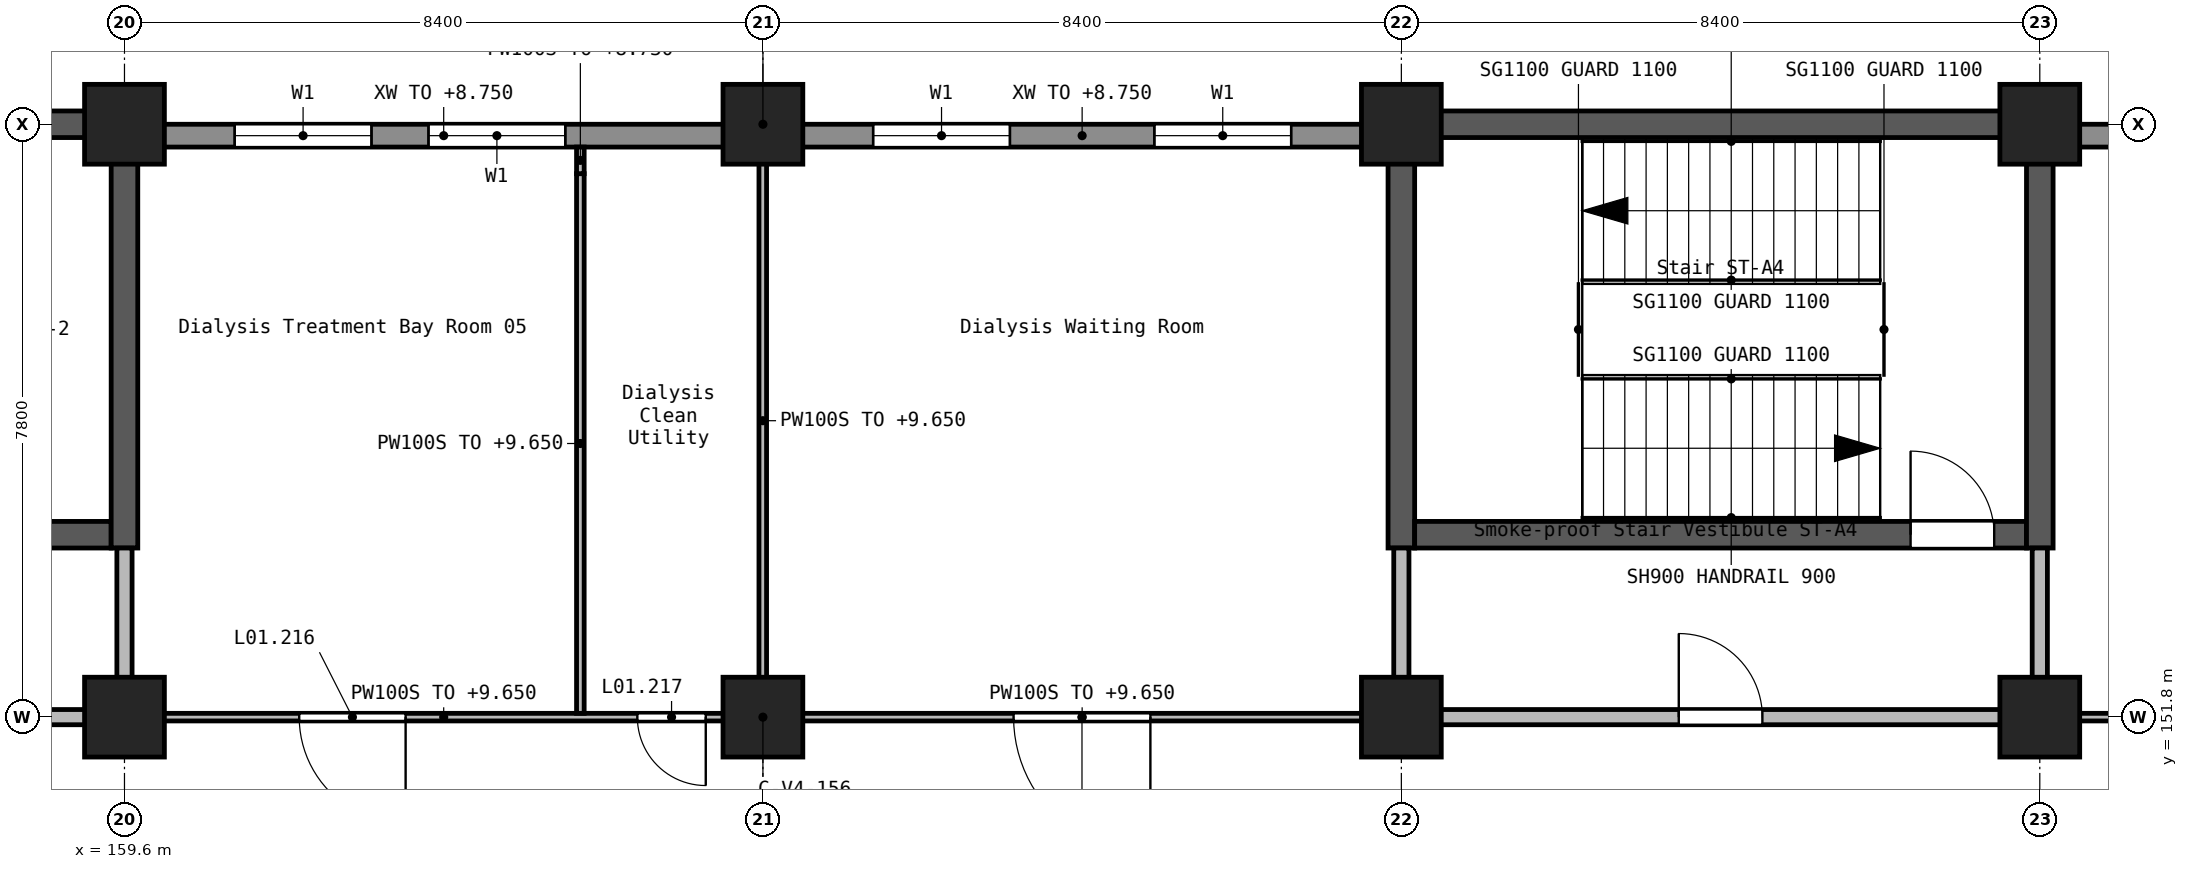
"""IFC4 building model, lengths in metres.
Left out: names, types, materials, properties, quantities, classifications, styles, units other than length and angle.
Written with IfcOpenShell. Run it as: python <this file> out.ifc"""

import sys

from ifc_helpers import new_model, si_unit, direction, frame, frame_2d, origin, origin_2d, place, context, subcontext, project, spatial, rectangle, extrude, element, fill, save


model = new_model("IFC4")
c1 = context("Model", 3, precision=1e-05, world=origin(), true_north=direction((0.0, 1.0)))
c2 = subcontext(c1, "Body", "Model", "MODEL_VIEW")
j1 = project(units=[si_unit("LENGTHUNIT", "METRE"), si_unit("PLANEANGLEUNIT", "RADIAN")], contexts=[c1])
p1 = place(None, origin())
s1 = spatial("IfcSite", under=j1, at=p1, CompositionType="ELEMENT")
p2 = place(p1, origin())
s2 = spatial("IfcBuilding", under=s1, at=p2, CompositionType="ELEMENT")
p3 = place(p2, frame((0.0, 0.0, 5.4)))
s3 = spatial("IfcBuildingStorey", under=s2, at=p3, CompositionType="ELEMENT", Elevation=5.4)
for number, where, z_axis, x_axis in (
    (1, (159.6, 151.8, 0.0), (0.0, 0.0, 1.0), (1.0, 0.0, 0.0)),
    (2, (159.6, 159.6, 0.0), (0.0, 0.0, 1.0), (1.0, 0.0, 0.0)),
    (3, (168.0, 151.8, 0.0), (0.0, 0.0, 1.0), (1.0, 0.0, 0.0)),
    (4, (168.0, 159.6, 0.0), (0.0, 0.0, 1.0), (1.0, 0.0, 0.0)),
    (5, (176.4, 151.8, 0.0), (0.0, 0.0, 1.0), (1.0, 0.0, 0.0)),
    (6, (176.4, 159.6, 0.0), (0.0, 0.0, 1.0), (1.0, 0.0, 0.0)),
    (7, (184.8, 151.8, 0.0), (0.0, 0.0, 1.0), (1.0, 0.0, 0.0)),
    (8, (184.8, 159.6, 0.0), (0.0, 0.0, 1.0), (1.0, 0.0, 0.0)),
):
    element("IfcColumn", number, at=place(p3, frame(where, z_axis=z_axis, x_axis=x_axis)), inside=s3, PredefinedType="COLUMN", context=c2, shape_type="SweptSolid", body=[
        extrude(rectangle(XDim=1.05, YDim=1.05, at=origin_2d()), origin(), (0.0, 0.0, 1.0), 4.5),
    ])
p4 = place(p3, frame((155.4, 154.2, 0.0), z_axis=(0.0, 0.0, 1.0), x_axis=(1.0, 0.0, 0.0)))
e9 = element("IfcWall", 9, at=p4, inside=s3, PredefinedType="SHEAR", context=c2, shape_type="SweptSolid", body=[
    extrude(rectangle(XDim=4.025, YDim=0.35, at=frame_2d((2.013, 0.0))), origin(), (0.0, 0.0, 1.0), 4.5),
])
p5 = place(p4, frame((1.55, 0.0, 0.0)))
e10 = element("IfcOpeningElement", 10, at=p5, cuts=e9, PredefinedType="OPENING", context=c2, shape_type="SweptSolid", body=[
    extrude(rectangle(XDim=1.1, YDim=2.1, at=frame_2d((0.55, 1.05))), frame((0.0, 0.185, 0.0), z_axis=(0.0, -1.0, 0.0), x_axis=(1.0, 0.0, 0.0)), (0.0, 0.0, 1.0), 0.37),
])
p6 = place(p3, frame((155.4, 159.6, 0.0), z_axis=(0.0, 0.0, 1.0), x_axis=(1.0, 0.0, 0.0)))
e11 = element("IfcWall", 11, at=p6, inside=s3, PredefinedType="SHEAR", context=c2, shape_type="SweptSolid", body=[
    extrude(rectangle(XDim=4.025, YDim=0.35, at=frame_2d((2.013, 0.0))), origin(), (0.0, 0.0, 1.0), 4.5),
])
p7 = place(p3, frame((159.6, 154.025, 0.0), z_axis=(0.0, 0.0, 1.0), x_axis=(0.0, 1.0, 0.0)))
e12 = element("IfcWall", 12, at=p7, inside=s3, PredefinedType="SHEAR", context=c2, shape_type="SweptSolid", body=[
    extrude(rectangle(XDim=5.75, YDim=0.35, at=frame_2d((2.875, 0.0))), origin(), (0.0, 0.0, 1.0), 4.5),
])
p8 = place(p3, frame((176.225, 159.6, 0.0), z_axis=(0.0, 0.0, 1.0), x_axis=(1.0, 0.0, 0.0)))
e13 = element("IfcWall", 13, at=p8, inside=s3, PredefinedType="SHEAR", context=c2, shape_type="SweptSolid", body=[
    extrude(rectangle(XDim=8.4, YDim=0.35, at=frame_2d((4.2, 0.0))), origin(), (0.0, 0.0, 1.0), 4.5),
])
p9 = place(p3, frame((176.4, 154.025, 0.0), z_axis=(0.0, 0.0, 1.0), x_axis=(0.0, 1.0, 0.0)))
e14 = element("IfcWall", 14, at=p9, inside=s3, PredefinedType="SHEAR", context=c2, shape_type="SweptSolid", body=[
    extrude(rectangle(XDim=5.4, YDim=0.35, at=frame_2d((2.7, 0.0))), origin(), (0.0, 0.0, 1.0), 4.5),
])
p10 = place(p3, frame((176.575, 154.2, 0.0), z_axis=(0.0, 0.0, 1.0), x_axis=(1.0, 0.0, 0.0)))
e15 = element("IfcWall", 15, at=p10, inside=s3, PredefinedType="SHEAR", context=c2, shape_type="SweptSolid", body=[
    extrude(rectangle(XDim=8.05, YDim=0.35, at=frame_2d((4.025, 0.0))), origin(), (0.0, 0.0, 1.0), 4.5),
])
p11 = place(p10, frame((6.525, 0.0, 0.0)))
e16 = element("IfcOpeningElement", 16, at=p11, cuts=e15, PredefinedType="OPENING", context=c2, shape_type="SweptSolid", body=[
    extrude(rectangle(XDim=1.1, YDim=2.1, at=frame_2d((0.55, 1.05))), frame((0.0, 0.185, 0.0), z_axis=(0.0, -1.0, 0.0), x_axis=(1.0, 0.0, 0.0)), (0.0, 0.0, 1.0), 0.37),
])
p12 = place(p3, frame((184.8, 154.025, 0.0), z_axis=(0.0, 0.0, 1.0), x_axis=(0.0, 1.0, 0.0)))
e17 = element("IfcWall", 17, at=p12, inside=s3, PredefinedType="SHEAR", context=c2, shape_type="SweptSolid", body=[
    extrude(rectangle(XDim=5.75, YDim=0.35, at=frame_2d((2.875, 0.0))), origin(), (0.0, 0.0, 1.0), 4.5),
])
p13 = place(p3, frame((192.75, 159.45, 0.0), z_axis=(0.0, 0.0, 1.0), x_axis=(-1.0, 0.0, 0.0)))
e18 = element("IfcWall", 18, at=p13, inside=s3, PredefinedType="STANDARD", context=c2, shape_type="SweptSolid", body=[
    extrude(rectangle(XDim=7.45, YDim=0.3, at=frame_2d((3.725, 0.0))), origin(), (0.0, 0.0, 1.0), 3.35),
])
p14 = place(p13, frame((0.962, 0.0, 0.9)))
e19 = element("IfcOpeningElement", 19, at=p14, cuts=e18, PredefinedType="OPENING", context=c2, shape_type="SweptSolid", body=[
    extrude(rectangle(XDim=1.8, YDim=1.5, at=frame_2d((0.9, 0.75))), frame((0.0, 0.16, 0.0), z_axis=(0.0, -1.0, 0.0), x_axis=(1.0, 0.0, 0.0)), (0.0, 0.0, 1.0), 0.32),
])
p15 = place(p13, frame((4.688, 0.0, 0.9)))
e20 = element("IfcOpeningElement", 20, at=p15, cuts=e18, PredefinedType="OPENING", context=c2, shape_type="SweptSolid", body=[
    extrude(rectangle(XDim=1.8, YDim=1.5, at=frame_2d((0.9, 0.75))), frame((0.0, 0.16, 0.0), z_axis=(0.0, -1.0, 0.0), x_axis=(1.0, 0.0, 0.0)), (0.0, 0.0, 1.0), 0.32),
])
p16 = place(p3, frame((175.9, 159.45, 0.0), z_axis=(0.0, 0.0, 1.0), x_axis=(-1.0, 0.0, 0.0)))
e21 = element("IfcWall", 21, at=p16, inside=s3, PredefinedType="STANDARD", context=c2, shape_type="SweptSolid", body=[
    extrude(rectangle(XDim=7.4, YDim=0.3, at=frame_2d((3.7, 0.0))), origin(), (0.0, 0.0, 1.0), 3.35),
])
p17 = place(p16, frame((0.95, 0.0, 0.9)))
e22 = element("IfcOpeningElement", 22, at=p17, cuts=e21, PredefinedType="OPENING", context=c2, shape_type="SweptSolid", body=[
    extrude(rectangle(XDim=1.8, YDim=1.5, at=frame_2d((0.9, 0.75))), frame((0.0, 0.16, 0.0), z_axis=(0.0, -1.0, 0.0), x_axis=(1.0, 0.0, 0.0)), (0.0, 0.0, 1.0), 0.32),
])
p18 = place(p16, frame((4.65, 0.0, 0.9)))
e23 = element("IfcOpeningElement", 23, at=p18, cuts=e21, PredefinedType="OPENING", context=c2, shape_type="SweptSolid", body=[
    extrude(rectangle(XDim=1.8, YDim=1.5, at=frame_2d((0.9, 0.75))), frame((0.0, 0.16, 0.0), z_axis=(0.0, -1.0, 0.0), x_axis=(1.0, 0.0, 0.0)), (0.0, 0.0, 1.0), 0.32),
])
p19 = place(p3, frame((167.5, 159.45, 0.0), z_axis=(0.0, 0.0, 1.0), x_axis=(-1.0, 0.0, 0.0)))
e24 = element("IfcWall", 24, at=p19, inside=s3, PredefinedType="STANDARD", context=c2, shape_type="SweptSolid", body=[
    extrude(rectangle(XDim=7.4, YDim=0.3, at=frame_2d((3.7, 0.0))), origin(), (0.0, 0.0, 1.0), 3.35),
])
p20 = place(p19, frame((2.1, 0.0, 0.9)))
e25 = element("IfcOpeningElement", 25, at=p20, cuts=e24, PredefinedType="OPENING", context=c2, shape_type="SweptSolid", body=[
    extrude(rectangle(XDim=1.8, YDim=1.5, at=frame_2d((0.9, 0.75))), frame((0.0, 0.16, 0.0), z_axis=(0.0, -1.0, 0.0), x_axis=(1.0, 0.0, 0.0)), (0.0, 0.0, 1.0), 0.32),
])
p21 = place(p19, frame((4.65, 0.0, 0.9)))
e26 = element("IfcOpeningElement", 26, at=p21, cuts=e24, PredefinedType="OPENING", context=c2, shape_type="SweptSolid", body=[
    extrude(rectangle(XDim=1.8, YDim=1.5, at=frame_2d((0.9, 0.75))), frame((0.0, 0.16, 0.0), z_axis=(0.0, -1.0, 0.0), x_axis=(1.0, 0.0, 0.0)), (0.0, 0.0, 1.0), 0.32),
])
p22 = place(p3, frame((159.1, 151.8, 0.0), z_axis=(0.0, 0.0, 1.0), x_axis=(-1.0, 0.0, 0.0)))
e27 = element("IfcWall", 27, at=p22, inside=s3, PredefinedType="SOLIDWALL", context=c2, shape_type="SweptSolid", body=[
    extrude(rectangle(XDim=7.4, YDim=0.2, at=frame_2d((3.7, 0.0))), origin(), (0.0, 0.0, 1.0), 4.25),
])
p23 = place(p22, frame((2.8, 0.0, 0.0)))
e28 = element("IfcOpeningElement", 28, at=p23, cuts=e27, PredefinedType="OPENING", context=c2, shape_type="SweptSolid", body=[
    extrude(rectangle(XDim=1.8, YDim=2.1, at=frame_2d((0.9, 1.05))), frame((0.0, 0.11, 0.0), z_axis=(0.0, -1.0, 0.0), x_axis=(1.0, 0.0, 0.0)), (0.0, 0.0, 1.0), 0.22),
])
p24 = place(p3, frame((176.9, 151.8, 0.0), z_axis=(0.0, 0.0, 1.0), x_axis=(1.0, 0.0, 0.0)))
e29 = element("IfcWall", 29, at=p24, inside=s3, PredefinedType="SOLIDWALL", context=c2, shape_type="SweptSolid", body=[
    extrude(rectangle(XDim=7.4, YDim=0.2, at=frame_2d((3.7, 0.0))), origin(), (0.0, 0.0, 1.0), 4.25),
])
p25 = place(p24, frame((3.15, 0.0, 0.0)))
e30 = element("IfcOpeningElement", 30, at=p25, cuts=e29, PredefinedType="OPENING", context=c2, shape_type="SweptSolid", body=[
    extrude(rectangle(XDim=1.1, YDim=2.1, at=frame_2d((0.55, 1.05))), frame((0.0, 0.11, 0.0), z_axis=(0.0, -1.0, 0.0), x_axis=(1.0, 0.0, 0.0)), (0.0, 0.0, 1.0), 0.22),
])
for number, where, z_axis, x_axis in (
    (31, (159.6, 152.3, 0.0), (0.0, 0.0, 1.0), (0.0, 1.0, 0.0)),
    (32, (176.4, 152.3, 0.0), (0.0, 0.0, 1.0), (0.0, 1.0, 0.0)),
    (33, (184.8, 152.3, 0.0), (0.0, 0.0, 1.0), (0.0, 1.0, 0.0)),
):
    element("IfcWall", number, at=place(p3, frame(where, z_axis=z_axis, x_axis=x_axis)), inside=s3, PredefinedType="SOLIDWALL", context=c2, shape_type="SweptSolid", body=[
        extrude(rectangle(XDim=1.725, YDim=0.2, at=frame_2d((0.862, 0.0))), origin(), (0.0, 0.0, 1.0), 4.25),
    ])
p26 = place(p3, frame((175.9, 151.8, 0.0), z_axis=(0.0, 0.0, 1.0), x_axis=(-1.0, 0.0, 0.0)))
e34 = element("IfcWall", 34, at=p26, inside=s3, PredefinedType="PARTITIONING", context=c2, shape_type="SweptSolid", body=[
    extrude(rectangle(XDim=7.4, YDim=0.1, at=frame_2d((3.7, 0.0))), origin(), (0.0, 0.0, 1.0), 4.25),
])
p27 = place(p26, frame((2.802, 0.0, 0.0)))
e35 = element("IfcOpeningElement", 35, at=p27, cuts=e34, PredefinedType="OPENING", context=c2, shape_type="SweptSolid", body=[
    extrude(rectangle(XDim=1.8, YDim=2.1, at=frame_2d((0.9, 1.05))), frame((0.0, 0.06, 0.0), z_axis=(0.0, -1.0, 0.0), x_axis=(1.0, 0.0, 0.0)), (0.0, 0.0, 1.0), 0.12),
])
p28 = place(p3, frame((167.5, 151.8, 0.0), z_axis=(0.0, 0.0, 1.0), x_axis=(-1.0, 0.0, 0.0)))
e36 = element("IfcWall", 36, at=p28, inside=s3, PredefinedType="PARTITIONING", context=c2, shape_type="SweptSolid", body=[
    extrude(rectangle(XDim=7.4, YDim=0.1, at=frame_2d((3.7, 0.0))), origin(), (0.0, 0.0, 1.0), 4.25),
])
p29 = place(p28, frame((4.201, 0.0, 0.0)))
e37 = element("IfcOpeningElement", 37, at=p29, cuts=e36, PredefinedType="OPENING", context=c2, shape_type="SweptSolid", body=[
    extrude(rectangle(XDim=1.4, YDim=2.1, at=frame_2d((0.7, 1.05))), frame((0.0, 0.06, 0.0), z_axis=(0.0, -1.0, 0.0), x_axis=(1.0, 0.0, 0.0)), (0.0, 0.0, 1.0), 0.12),
])
p30 = place(p28, frame((0.252, 0.0, 0.0)))
e38 = element("IfcOpeningElement", 38, at=p30, cuts=e36, PredefinedType="OPENING", context=c2, shape_type="SweptSolid", body=[
    extrude(rectangle(XDim=0.9, YDim=2.1, at=frame_2d((0.45, 1.05))), frame((0.0, 0.06, 0.0), z_axis=(0.0, -1.0, 0.0), x_axis=(1.0, 0.0, 0.0)), (0.0, 0.0, 1.0), 0.12),
])
p31 = place(p3, frame((185.3, 151.8, 0.0), z_axis=(0.0, 0.0, 1.0), x_axis=(1.0, 0.0, 0.0)))
e39 = element("IfcWall", 39, at=p31, inside=s3, PredefinedType="PARTITIONING", context=c2, shape_type="SweptSolid", body=[
    extrude(rectangle(XDim=7.1, YDim=0.1, at=frame_2d((3.55, 0.0))), origin(), (0.0, 0.0, 1.0), 4.25),
])
p32 = place(p31, frame((3.0, 0.0, 0.0)))
e40 = element("IfcOpeningElement", 40, at=p32, cuts=e39, PredefinedType="OPENING", context=c2, shape_type="SweptSolid", body=[
    extrude(rectangle(XDim=1.4, YDim=2.1, at=frame_2d((0.7, 1.05))), frame((0.0, 0.06, 0.0), z_axis=(0.0, -1.0, 0.0), x_axis=(1.0, 0.0, 0.0)), (0.0, 0.0, 1.0), 0.12),
])
p33 = place(p3, frame((165.598, 151.85, 0.0), z_axis=(0.0, 0.0, 1.0), x_axis=(0.0, 1.0, 0.0)))
e41 = element("IfcWall", 41, at=p33, inside=s3, PredefinedType="PARTITIONING", context=c2, shape_type="SweptSolid", body=[
    extrude(rectangle(XDim=7.1, YDim=0.1, at=frame_2d((3.55, 0.0))), origin(), (0.0, 0.0, 1.0), 4.25),
])
p34 = place(p3, frame((165.598, 158.95, 0.0), z_axis=(0.0, 0.0, 1.0), x_axis=(0.0, 1.0, 0.0)))
e42 = element("IfcWall", 42, at=p34, inside=s3, PredefinedType="PARTITIONING", context=c2, shape_type="SweptSolid", body=[
    extrude(rectangle(XDim=0.35, YDim=0.1, at=frame_2d((0.175, 0.0))), origin(), (0.0, 0.0, 1.0), 3.33),
])
p35 = place(p3, frame((167.998, 152.3, 0.0), z_axis=(0.0, 0.0, 1.0), x_axis=(0.0, 1.0, 0.0)))
e43 = element("IfcWall", 43, at=p35, inside=s3, PredefinedType="PARTITIONING", context=c2, shape_type="SweptSolid", body=[
    extrude(rectangle(XDim=6.8, YDim=0.1, at=frame_2d((3.4, 0.0))), origin(), (0.0, 0.0, 1.0), 4.25),
])
p36 = place(p17, origin())
e44 = element("IfcWindow", 44, at=p36, inside=s3, PartitioningType="SINGLE_PANEL", PredefinedType="WINDOW", context=c2, shape_type="SweptSolid", body=[
    extrude(rectangle(XDim=1.8, YDim=1.5, at=frame_2d((0.9, 0.75))), frame((0.0, 0.03, 0.0), z_axis=(0.0, -1.0, 0.0), x_axis=(1.0, 0.0, 0.0)), (0.0, 0.0, 1.0), 0.06),
])
fill(e22, e44)
p37 = place(p18, origin())
e45 = element("IfcWindow", 45, at=p37, inside=s3, PartitioningType="SINGLE_PANEL", PredefinedType="WINDOW", context=c2, shape_type="SweptSolid", body=[
    extrude(rectangle(XDim=1.8, YDim=1.5, at=frame_2d((0.9, 0.75))), frame((0.0, 0.03, 0.0), z_axis=(0.0, -1.0, 0.0), x_axis=(1.0, 0.0, 0.0)), (0.0, 0.0, 1.0), 0.06),
])
fill(e23, e45)
p38 = place(p20, origin())
e46 = element("IfcWindow", 46, at=p38, inside=s3, PartitioningType="SINGLE_PANEL", PredefinedType="WINDOW", context=c2, shape_type="SweptSolid", body=[
    extrude(rectangle(XDim=1.8, YDim=1.5, at=frame_2d((0.9, 0.75))), frame((0.0, 0.03, 0.0), z_axis=(0.0, -1.0, 0.0), x_axis=(1.0, 0.0, 0.0)), (0.0, 0.0, 1.0), 0.06),
])
fill(e25, e46)
p39 = place(p21, origin())
e47 = element("IfcWindow", 47, at=p39, inside=s3, PartitioningType="SINGLE_PANEL", PredefinedType="WINDOW", context=c2, shape_type="SweptSolid", body=[
    extrude(rectangle(XDim=1.8, YDim=1.5, at=frame_2d((0.9, 0.75))), frame((0.0, 0.03, 0.0), z_axis=(0.0, -1.0, 0.0), x_axis=(1.0, 0.0, 0.0)), (0.0, 0.0, 1.0), 0.06),
])
fill(e26, e47)
p40 = place(p11, origin())
e48 = element("IfcDoor", 48, at=p40, inside=s3, OperationType="SINGLE_SWING_RIGHT", PredefinedType="DOOR", context=c2, shape_type="SweptSolid", body=[
    extrude(rectangle(XDim=1.1, YDim=2.1, at=frame_2d((0.55, 1.05))), frame((0.0, 0.025, 0.0), z_axis=(0.0, -1.0, 0.0), x_axis=(1.0, 0.0, 0.0)), (0.0, 0.0, 1.0), 0.05),
])
fill(e16, e48)
p41 = place(p25, origin())
e49 = element("IfcDoor", 49, at=p41, inside=s3, OperationType="SINGLE_SWING_RIGHT", PredefinedType="DOOR", context=c2, shape_type="SweptSolid", body=[
    extrude(rectangle(XDim=1.1, YDim=2.1, at=frame_2d((0.55, 1.05))), frame((0.0, 0.025, 0.0), z_axis=(0.0, -1.0, 0.0), x_axis=(1.0, 0.0, 0.0)), (0.0, 0.0, 1.0), 0.05),
])
fill(e30, e49)
p42 = place(p29, frame((1.4, 0.0, 0.0), z_axis=(0.0, 0.0, 1.0), x_axis=(-1.0, 0.0, 0.0)))
e50 = element("IfcDoor", 50, at=p42, inside=s3, OperationType="DOUBLE_DOOR_SINGLE_SWING", PredefinedType="DOOR", context=c2, shape_type="SweptSolid", body=[
    extrude(rectangle(XDim=1.4, YDim=2.1, at=frame_2d((0.7, 1.05))), frame((0.0, 0.025, 0.0), z_axis=(0.0, -1.0, 0.0), x_axis=(1.0, 0.0, 0.0)), (0.0, 0.0, 1.0), 0.05),
])
fill(e37, e50)
p43 = place(p30, frame((0.9, 0.0, 0.0), z_axis=(0.0, 0.0, 1.0), x_axis=(-1.0, 0.0, 0.0)))
e51 = element("IfcDoor", 51, at=p43, inside=s3, OperationType="SINGLE_SWING_RIGHT", PredefinedType="DOOR", context=c2, shape_type="SweptSolid", body=[
    extrude(rectangle(XDim=0.9, YDim=2.1, at=frame_2d((0.45, 1.05))), frame((0.0, 0.025, 0.0), z_axis=(0.0, -1.0, 0.0), x_axis=(1.0, 0.0, 0.0)), (0.0, 0.0, 1.0), 0.05),
])
fill(e38, e51)
p44 = place(p27, frame((1.8, 0.0, 0.0), z_axis=(0.0, 0.0, 1.0), x_axis=(-1.0, 0.0, 0.0)))
e52 = element("IfcDoor", 52, at=p44, inside=s3, OperationType="DOUBLE_DOOR_SINGLE_SWING", PredefinedType="DOOR", context=c2, shape_type="SweptSolid", body=[
    extrude(rectangle(XDim=1.8, YDim=2.1, at=frame_2d((0.9, 1.05))), frame((0.0, 0.025, 0.0), z_axis=(0.0, -1.0, 0.0), x_axis=(1.0, 0.0, 0.0)), (0.0, 0.0, 1.0), 0.05),
])
fill(e35, e52)
save(model, sys.argv[1])
